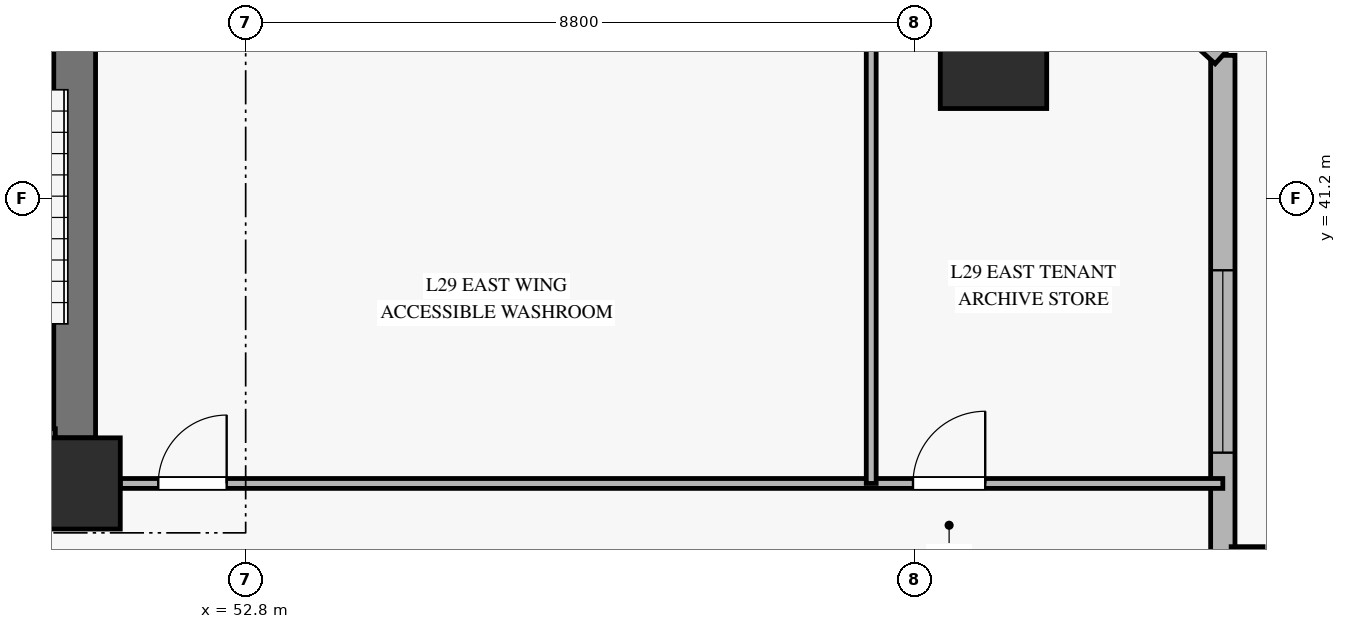
"""IFC4 building model, lengths in metres.
Left out: names, types, materials, properties, quantities, classifications, styles, units other than length and angle.
Written with IfcOpenShell. Run it as: python <this file> out.ifc"""

import sys

from ifc_helpers import new_model, si_unit, direction, frame, frame_2d, origin, origin_2d, place, context, subcontext, project, spatial, rectangle, hollow_rectangle, extrude, source, transform, mapped, element, fill, save


model = new_model("IFC4")
c1 = context("Model", 3, precision=1e-05, world=origin(), true_north=direction((0.0, 1.0)))
c2 = subcontext(c1, "Body", "Model", "MODEL_VIEW")
j1 = project(units=[si_unit("LENGTHUNIT", "METRE"), si_unit("PLANEANGLEUNIT", "RADIAN")], contexts=[c1])
p1 = place(None, origin())
s1 = spatial("IfcSite", under=j1, at=p1, CompositionType="ELEMENT")
p2 = place(p1, origin())
s2 = spatial("IfcBuilding", under=s1, at=p2, CompositionType="ELEMENT")
p3 = place(p2, frame((0.0, 0.0, 119.2)))
s3 = spatial("IfcBuildingStorey", under=s2, at=p3, CompositionType="ELEMENT", Elevation=119.2)
m1 = source(origin(), c2, "Body", "SweptSolid", [
    extrude(rectangle(XDim=1.2, YDim=1.2, at=origin_2d()), origin(), (0.0, 0.0, 1.0), 3.68),
])
p4 = place(p3, frame((50.55, 37.45, 0.0), z_axis=(0.0, 0.0, 1.0), x_axis=(1.0, 0.0, 0.0)))
e1 = element("IfcColumn", 1, at=p4, inside=s3, PredefinedType="PILASTER", context=c2, shape_type="MappedRepresentation", body=[
    mapped(m1, transform((0.0, 0.0, 0.0), x_axis=(1.0, 0.0, 0.0), y_axis=(0.0, 1.0, 0.0), z_axis=(0.0, 0.0, 1.0), scale=1.0)),
])
p5 = place(p3, frame((50.55, 38.05, 0.0), z_axis=(0.0, 0.0, 1.0), x_axis=(0.0, 1.0, 0.0)))
e2 = element("IfcWall", 2, at=p5, inside=s3, PredefinedType="SHEAR", context=c2, shape_type="SweptSolid", body=[
    extrude(rectangle(XDim=7.9, YDim=0.55, at=frame_2d((3.95, 0.0))), origin(), (0.0, 0.0, 1.0), 3.68),
])
m2 = source(origin(), c2, "Body", "SweptSolid", [
    extrude(hollow_rectangle(XDim=1.4, YDim=1.4, WallThickness=0.065, at=origin_2d()), origin(), (0.0, 0.0, 1.0), 3.686),
])
p6 = place(p3, frame((62.639, 43.083, 0.0), z_axis=(-0.056697532498, 0.007020956127, 0.998366714181), x_axis=(-0.122893119903, -0.992419911671, 0.0)))
e3 = element("IfcColumn", 3, at=p6, inside=s3, PredefinedType="COLUMN", context=c2, shape_type="MappedRepresentation", body=[
    mapped(m2, transform((0.0, 0.0, 0.0), x_axis=(1.0, 0.0, 0.0), y_axis=(0.0, 1.0, 0.0), z_axis=(0.0, 0.0, 1.0), scale=1.0)),
])
p7 = place(p3, frame((65.656, 26.995, 0.0), z_axis=(0.0, 0.0, 1.0), x_axis=(0.0, 1.0, 0.0)))
e4 = element("IfcWall", 4, at=p7, inside=s3, PredefinedType="SOLIDWALL", context=c2, shape_type="SweptSolid", body=[
    extrude(rectangle(XDim=16.088, YDim=0.32, at=frame_2d((8.044, 0.0))), origin(), (0.0, 0.0, 1.0), 3.16),
])
p8 = place(p7, frame((10.86, 0.0, 0.45)))
e5 = element("IfcOpeningElement", 5, at=p8, cuts=e4, PredefinedType="OPENING", context=c2, shape_type="SweptSolid", body=[
    extrude(rectangle(XDim=2.4, YDim=2.1, at=frame_2d((1.2, 1.05))), frame((0.0, 0.17, 0.0), z_axis=(0.0, -1.0, 0.0), x_axis=(1.0, 0.0, 0.0)), (0.0, 0.0, 1.0), 0.34),
])
p9 = place(p3, frame((65.656, 43.083, 0.0), z_axis=(0.0, 0.0, 1.0), x_axis=(-0.738333520178, 0.674435773801, 0.0)))
e6 = element("IfcWall", 6, at=p9, inside=s3, PredefinedType="SOLIDWALL", context=c2, shape_type="SweptSolid", body=[
    extrude(rectangle(XDim=4.696, YDim=0.3, at=frame_2d((2.348, 0.0))), origin(), (0.0, 0.0, 1.0), 3.16),
])
p10 = place(p9, frame((1.548, 0.0, 0.45)))
e7 = element("IfcOpeningElement", 7, at=p10, cuts=e6, PredefinedType="OPENING", context=c2, shape_type="SweptSolid", body=[
    extrude(rectangle(XDim=1.6, YDim=2.0, at=frame_2d((0.8, 1.0))), frame((0.0, 0.16, 0.0), z_axis=(0.0, -1.0, 0.0), x_axis=(1.0, 0.0, 0.0)), (0.0, 0.0, 1.0), 0.32),
])
p11 = place(p3, frame((47.44, 38.07, 0.0), z_axis=(0.0, 0.0, 1.0), x_axis=(1.0, 0.0, 0.0)))
e8 = element("IfcWall", 8, at=p11, inside=s3, PredefinedType="SOLIDWALL", context=c2, shape_type="SweptSolid", body=[
    extrude(rectangle(XDim=2.855, YDim=0.2, at=frame_2d((1.427, 0.0))), origin(), (0.0, 0.0, 1.0), 3.9),
])
p12 = place(p3, frame((51.15, 37.45, 0.0), z_axis=(0.0, 0.0, 1.0), x_axis=(1.0, 0.0, 0.0)))
e9 = element("IfcWall", 9, at=p12, inside=s3, PredefinedType="PARTITIONING", context=c2, shape_type="SweptSolid", body=[
    extrude(rectangle(XDim=14.506, YDim=0.13, at=frame_2d((7.253, 0.0))), origin(), (0.0, 0.0, 1.0), 3.165),
])
p13 = place(p12, frame((0.5, 0.0, 0.0)))
e10 = element("IfcOpeningElement", 10, at=p13, cuts=e9, PredefinedType="OPENING", context=c2, shape_type="SweptSolid", body=[
    extrude(rectangle(XDim=0.9, YDim=2.1, at=frame_2d((0.45, 1.05))), frame((0.0, 0.075, 0.0), z_axis=(0.0, -1.0, 0.0), x_axis=(1.0, 0.0, 0.0)), (0.0, 0.0, 1.0), 0.15),
])
p14 = place(p12, frame((10.43, 0.0, 0.0)))
e11 = element("IfcOpeningElement", 11, at=p14, cuts=e9, PredefinedType="OPENING", context=c2, shape_type="SweptSolid", body=[
    extrude(rectangle(XDim=0.95, YDim=2.1, at=frame_2d((0.475, 1.05))), frame((0.0, 0.075, 0.0), z_axis=(0.0, -1.0, 0.0), x_axis=(1.0, 0.0, 0.0)), (0.0, 0.0, 1.0), 0.15),
])
p15 = place(p3, frame((61.03, 37.45, 0.0), z_axis=(0.0, 0.0, 1.0), x_axis=(0.0, 1.0, 0.0)))
e12 = element("IfcWall", 12, at=p15, inside=s3, PredefinedType="PARTITIONING", context=c2, shape_type="SweptSolid", body=[
    extrude(rectangle(XDim=8.8, YDim=0.13, at=frame_2d((4.4, 0.0))), origin(), (0.0, 0.0, 1.0), 3.68),
])
m3 = source(origin(), c2, "Body", "SweptSolid", [
    extrude(rectangle(XDim=2.4, YDim=2.1, at=frame_2d((1.2, 1.05))), frame((0.0, 0.03, 0.0), z_axis=(0.0, -1.0, 0.0), x_axis=(1.0, 0.0, 0.0)), (0.0, 0.0, 1.0), 0.06),
])
p16 = place(p8, origin())
e13 = element("IfcWindow", 13, at=p16, inside=s3, PartitioningType="SINGLE_PANEL", PredefinedType="WINDOW", context=c2, shape_type="MappedRepresentation", body=[
    mapped(m3, transform((0.0, 0.0, 0.0), x_axis=(1.0, 0.0, 0.0), y_axis=(0.0, 1.0, 0.0), z_axis=(0.0, 0.0, 1.0), scale=1.0)),
])
fill(e5, e13)
m4 = source(origin(), c2, "Body", "SweptSolid", [
    extrude(rectangle(XDim=0.9, YDim=2.1, at=frame_2d((0.45, 1.05))), frame((0.0, 0.025, 0.0), z_axis=(0.0, -1.0, 0.0), x_axis=(1.0, 0.0, 0.0)), (0.0, 0.0, 1.0), 0.05),
])
p17 = place(p13, origin())
e14 = element("IfcDoor", 14, at=p17, inside=s3, OperationType="SINGLE_SWING_RIGHT", PredefinedType="DOOR", context=c2, shape_type="MappedRepresentation", body=[
    mapped(m4, transform((0.0, 0.0, 0.0), x_axis=(1.0, 0.0, 0.0), y_axis=(0.0, 1.0, 0.0), z_axis=(0.0, 0.0, 1.0), scale=1.0)),
])
fill(e10, e14)
m5 = source(origin(), c2, "Body", "SweptSolid", [
    extrude(rectangle(XDim=0.95, YDim=2.1, at=frame_2d((0.475, 1.05))), frame((0.0, 0.025, 0.0), z_axis=(0.0, -1.0, 0.0), x_axis=(1.0, 0.0, 0.0)), (0.0, 0.0, 1.0), 0.05),
])
p18 = place(p14, origin())
e15 = element("IfcDoor", 15, at=p18, inside=s3, OperationType="SINGLE_SWING_RIGHT", PredefinedType="DOOR", context=c2, shape_type="MappedRepresentation", body=[
    mapped(m5, transform((0.0, 0.0, 0.0), x_axis=(1.0, 0.0, 0.0), y_axis=(0.0, 1.0, 0.0), z_axis=(0.0, 0.0, 1.0), scale=1.0)),
])
fill(e11, e15)
save(model, sys.argv[1])
